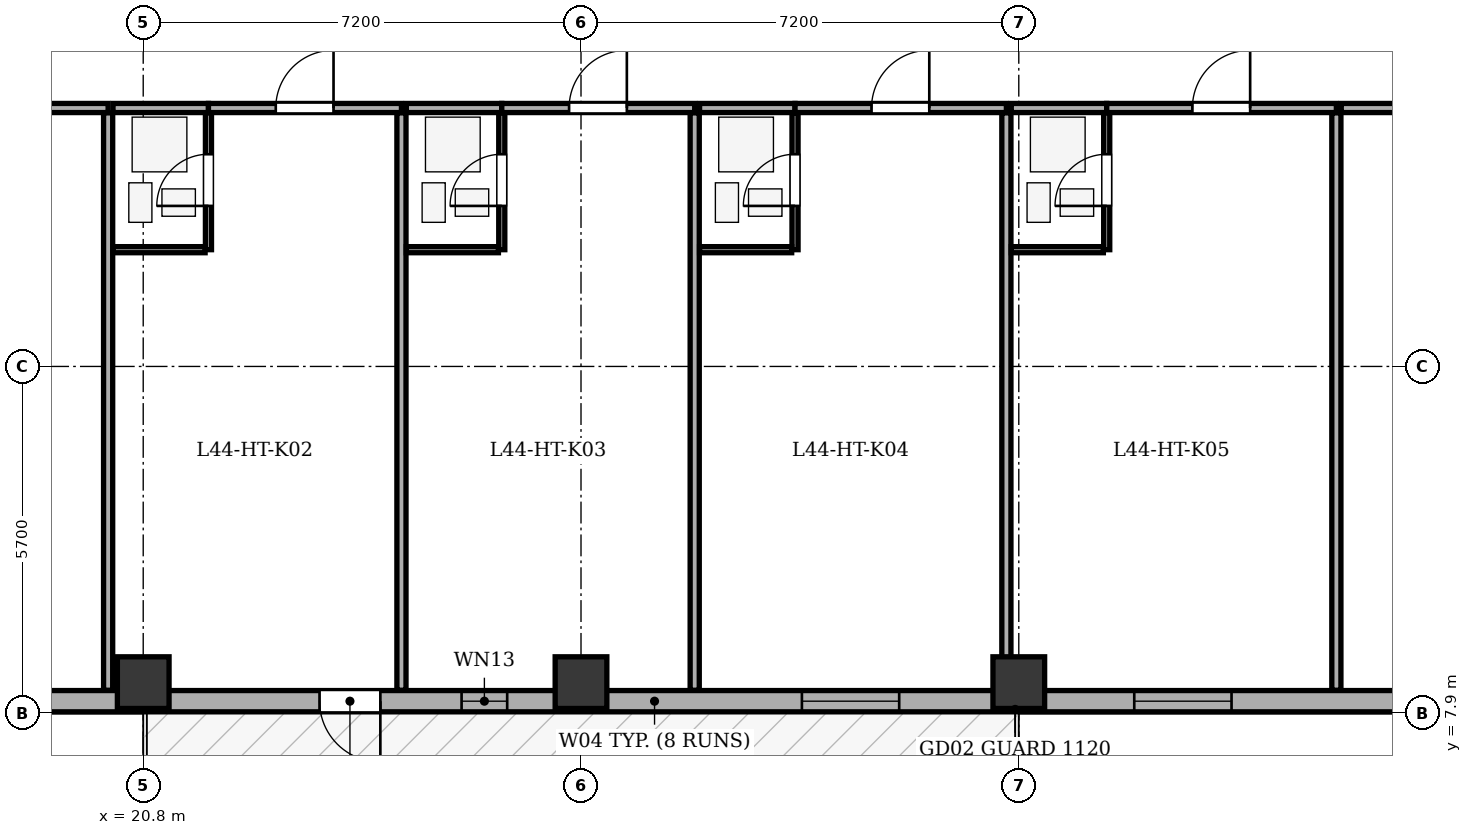
"""IFC4 building model, lengths in metres.
Left out: names, types, materials, properties, quantities, classifications, styles, units other than length and angle.
Written with IfcOpenShell. Run it as: python <this file> out.ifc"""

import sys

from ifc_helpers import new_model, si_unit, direction, frame, frame_2d, origin, origin_2d, place, context, subcontext, project, spatial, rectangle, extrude, element, fill, save


model = new_model("IFC4")
c1 = context("Model", 3, precision=1e-05, world=origin(), true_north=direction((0.0, 1.0)))
c2 = subcontext(c1, "Body", "Model", "MODEL_VIEW")
j1 = project(units=[si_unit("LENGTHUNIT", "METRE"), si_unit("PLANEANGLEUNIT", "RADIAN")], contexts=[c1])
p1 = place(None, origin())
s1 = spatial("IfcSite", under=j1, at=p1, CompositionType="ELEMENT")
p2 = place(p1, origin())
s2 = spatial("IfcBuilding", under=s1, at=p2, CompositionType="ELEMENT")
p3 = place(p2, frame((0.0, 0.0, 172.8)))
s3 = spatial("IfcBuildingStorey", under=s2, at=p3, CompositionType="ELEMENT", Elevation=172.8)
for number, where, z_axis, x_axis in (
    (1, (20.8, 8.4, 0.0), (0.0, 0.0, 1.0), (1.0, 0.0, 0.0)),
    (2, (28.0, 8.4, 0.0), (0.0, 0.0, 1.0), (1.0, 0.0, 0.0)),
    (3, (35.2, 8.4, 0.0), (0.0, 0.0, 1.0), (1.0, 0.0, 0.0)),
):
    element("IfcColumn", number, at=place(p3, frame(where, z_axis=z_axis, x_axis=x_axis)), inside=s3, PredefinedType="COLUMN", context=c2, shape_type="SweptSolid", body=[
        extrude(rectangle(XDim=0.85, YDim=0.85, at=origin_2d()), origin(), (0.0, 0.0, 1.0), 3.5),
    ])
p4 = place(p3, frame((50.7, 8.095, 0.0), z_axis=(0.0, 0.0, 1.0), x_axis=(-1.0, 0.0, 0.0)))
e4 = element("IfcWall", 4, at=p4, inside=s3, PredefinedType="STANDARD", context=c2, shape_type="SweptSolid", body=[
    extrude(rectangle(XDim=35.0, YDim=0.35, at=frame_2d((17.5, 0.0))), origin(), (0.0, 0.0, 1.0), 2.785),
])
p5 = place(p4, frame((26.0, 0.0, 0.0)))
e5 = element("IfcOpeningElement", 5, at=p5, cuts=e4, PredefinedType="OPENING", context=c2, shape_type="SweptSolid", body=[
    extrude(rectangle(XDim=1.0, YDim=2.02, at=frame_2d((0.5, 1.01))), frame((0.0, 0.185, 0.0), z_axis=(0.0, -1.0, 0.0), x_axis=(1.0, 0.0, 0.0)), (0.0, 0.0, 1.0), 0.37),
])
p6 = place(p4, frame((1.763, 0.0, 0.75)))
e6 = element("IfcOpeningElement", 6, at=p6, cuts=e4, PredefinedType="OPENING", context=c2, shape_type="SweptSolid", body=[
    extrude(rectangle(XDim=1.6, YDim=1.75, at=frame_2d((0.8, 0.875))), frame((0.0, 0.185, 0.0), z_axis=(0.0, -1.0, 0.0), x_axis=(1.0, 0.0, 0.0)), (0.0, 0.0, 1.0), 0.37),
])
p7 = place(p4, frame((6.764, 0.0, 0.75)))
e7 = element("IfcOpeningElement", 7, at=p7, cuts=e4, PredefinedType="OPENING", context=c2, shape_type="SweptSolid", body=[
    extrude(rectangle(XDim=1.6, YDim=1.75, at=frame_2d((0.8, 0.875))), frame((0.0, 0.185, 0.0), z_axis=(0.0, -1.0, 0.0), x_axis=(1.0, 0.0, 0.0)), (0.0, 0.0, 1.0), 0.37),
])
p8 = place(p4, frame((12.001, 0.0, 0.75)))
e8 = element("IfcOpeningElement", 8, at=p8, cuts=e4, PredefinedType="OPENING", context=c2, shape_type="SweptSolid", body=[
    extrude(rectangle(XDim=1.6, YDim=1.75, at=frame_2d((0.8, 0.875))), frame((0.0, 0.185, 0.0), z_axis=(0.0, -1.0, 0.0), x_axis=(1.0, 0.0, 0.0)), (0.0, 0.0, 1.0), 0.37),
])
p9 = place(p4, frame((17.467, 0.0, 0.75)))
e9 = element("IfcOpeningElement", 9, at=p9, cuts=e4, PredefinedType="OPENING", context=c2, shape_type="SweptSolid", body=[
    extrude(rectangle(XDim=1.6, YDim=1.75, at=frame_2d((0.8, 0.875))), frame((0.0, 0.185, 0.0), z_axis=(0.0, -1.0, 0.0), x_axis=(1.0, 0.0, 0.0)), (0.0, 0.0, 1.0), 0.37),
])
p10 = place(p4, frame((31.801, 0.0, 0.75)))
e10 = element("IfcOpeningElement", 10, at=p10, cuts=e4, PredefinedType="OPENING", context=c2, shape_type="SweptSolid", body=[
    extrude(rectangle(XDim=1.6, YDim=1.75, at=frame_2d((0.8, 0.875))), frame((0.0, 0.185, 0.0), z_axis=(0.0, -1.0, 0.0), x_axis=(1.0, 0.0, 0.0)), (0.0, 0.0, 1.0), 0.37),
])
p11 = place(p4, frame((23.914, 0.0, 0.75)))
e11 = element("IfcOpeningElement", 11, at=p11, cuts=e4, PredefinedType="OPENING", context=c2, shape_type="SweptSolid", body=[
    extrude(rectangle(XDim=0.75, YDim=1.45, at=frame_2d((0.375, 0.725))), frame((0.0, 0.185, 0.0), z_axis=(0.0, -1.0, 0.0), x_axis=(1.0, 0.0, 0.0)), (0.0, 0.0, 1.0), 0.37),
])
p12 = place(p3, frame((17.35, 17.85, 0.0), z_axis=(0.0, 0.0, 1.0), x_axis=(1.0, 0.0, 0.0)))
e12 = element("IfcWall", 12, at=p12, inside=s3, PredefinedType="PARTITIONING", context=c2, shape_type="SweptSolid", body=[
    extrude(rectangle(XDim=2.873, YDim=0.15, at=frame_2d((1.437, 0.0))), origin(), (0.0, 0.0, 1.0), 3.2),
])
p13 = place(p12, frame((0.957, 0.0, 0.0)))
e13 = element("IfcOpeningElement", 13, at=p13, cuts=e12, PredefinedType="OPENING", context=c2, shape_type="SweptSolid", body=[
    extrude(rectangle(XDim=0.95, YDim=2.1, at=frame_2d((0.475, 1.05))), frame((0.0, 0.085, 0.0), z_axis=(0.0, -1.0, 0.0), x_axis=(1.0, 0.0, 0.0)), (0.0, 0.0, 1.0), 0.17),
])
p14 = place(p3, frame((20.223, 8.275, 0.0), z_axis=(0.0, 0.0, 1.0), x_axis=(0.0, 1.0, 0.0)))
e14 = element("IfcWall", 14, at=p14, inside=s3, PredefinedType="PARTITIONING", context=c2, shape_type="SweptSolid", body=[
    extrude(rectangle(XDim=9.495, YDim=0.15, at=frame_2d((4.748, 0.0))), origin(), (0.0, 0.0, 1.0), 3.2),
])
p15 = place(p3, frame((20.303, 17.85, 0.0), z_axis=(0.0, 0.0, 1.0), x_axis=(1.0, 0.0, 0.0)))
e15 = element("IfcWall", 15, at=p15, inside=s3, PredefinedType="PARTITIONING", context=c2, shape_type="SweptSolid", body=[
    extrude(rectangle(XDim=1.57, YDim=0.15, at=frame_2d((0.785, 0.0))), origin(), (0.0, 0.0, 1.0), 3.2),
])
p16 = place(p3, frame((21.873, 17.85, 0.0), z_axis=(0.0, 0.0, 1.0), x_axis=(1.0, 0.0, 0.0)))
e16 = element("IfcWall", 16, at=p16, inside=s3, PredefinedType="PARTITIONING", context=c2, shape_type="SweptSolid", body=[
    extrude(rectangle(XDim=3.174, YDim=0.15, at=frame_2d((1.587, 0.0))), origin(), (0.0, 0.0, 1.0), 3.2),
])
p17 = place(p16, frame((1.107, 0.0, 0.0)))
e17 = element("IfcOpeningElement", 17, at=p17, cuts=e16, PredefinedType="OPENING", context=c2, shape_type="SweptSolid", body=[
    extrude(rectangle(XDim=0.95, YDim=2.1, at=frame_2d((0.475, 1.05))), frame((0.0, 0.085, 0.0), z_axis=(0.0, -1.0, 0.0), x_axis=(1.0, 0.0, 0.0)), (0.0, 0.0, 1.0), 0.17),
])
p18 = place(p3, frame((21.873, 15.52, 0.0), z_axis=(0.0, 0.0, 1.0), x_axis=(0.0, 1.0, 0.0)))
e18 = element("IfcWall", 18, at=p18, inside=s3, PredefinedType="PARTITIONING", context=c2, shape_type="SweptSolid", body=[
    extrude(rectangle(XDim=2.25, YDim=0.1, at=frame_2d((1.125, 0.0))), origin(), (0.0, 0.0, 1.0), 3.2),
])
p19 = place(p18, frame((0.72, 0.0, 0.0)))
e19 = element("IfcOpeningElement", 19, at=p19, cuts=e18, PredefinedType="OPENING", context=c2, shape_type="SweptSolid", body=[
    extrude(rectangle(XDim=0.85, YDim=2.05, at=frame_2d((0.425, 1.025))), frame((0.0, 0.06, 0.0), z_axis=(0.0, -1.0, 0.0), x_axis=(1.0, 0.0, 0.0)), (0.0, 0.0, 1.0), 0.12),
])
p20 = place(p3, frame((20.303, 15.52, 0.0), z_axis=(0.0, 0.0, 1.0), x_axis=(1.0, 0.0, 0.0)))
e20 = element("IfcWall", 20, at=p20, inside=s3, PredefinedType="PARTITIONING", context=c2, shape_type="SweptSolid", body=[
    extrude(rectangle(XDim=1.515, YDim=0.1, at=frame_2d((0.758, 0.0))), origin(), (0.0, 0.0, 1.0), 3.2),
])
p21 = place(p3, frame((25.047, 8.275, 0.0), z_axis=(0.0, 0.0, 1.0), x_axis=(0.0, 1.0, 0.0)))
e21 = element("IfcWall", 21, at=p21, inside=s3, PredefinedType="PARTITIONING", context=c2, shape_type="SweptSolid", body=[
    extrude(rectangle(XDim=9.495, YDim=0.15, at=frame_2d((4.748, 0.0))), origin(), (0.0, 0.0, 1.0), 3.2),
])
p22 = place(p3, frame((25.127, 17.85, 0.0), z_axis=(0.0, 0.0, 1.0), x_axis=(1.0, 0.0, 0.0)))
e22 = element("IfcWall", 22, at=p22, inside=s3, PredefinedType="PARTITIONING", context=c2, shape_type="SweptSolid", body=[
    extrude(rectangle(XDim=1.57, YDim=0.15, at=frame_2d((0.785, 0.0))), origin(), (0.0, 0.0, 1.0), 3.2),
])
p23 = place(p3, frame((26.697, 17.85, 0.0), z_axis=(0.0, 0.0, 1.0), x_axis=(1.0, 0.0, 0.0)))
e23 = element("IfcWall", 23, at=p23, inside=s3, PredefinedType="PARTITIONING", context=c2, shape_type="SweptSolid", body=[
    extrude(rectangle(XDim=3.173, YDim=0.15, at=frame_2d((1.586, 0.0))), origin(), (0.0, 0.0, 1.0), 3.2),
])
p24 = place(p23, frame((1.107, 0.0, 0.0)))
e24 = element("IfcOpeningElement", 24, at=p24, cuts=e23, PredefinedType="OPENING", context=c2, shape_type="SweptSolid", body=[
    extrude(rectangle(XDim=0.95, YDim=2.1, at=frame_2d((0.475, 1.05))), frame((0.0, 0.085, 0.0), z_axis=(0.0, -1.0, 0.0), x_axis=(1.0, 0.0, 0.0)), (0.0, 0.0, 1.0), 0.17),
])
p25 = place(p3, frame((26.697, 15.52, 0.0), z_axis=(0.0, 0.0, 1.0), x_axis=(0.0, 1.0, 0.0)))
e25 = element("IfcWall", 25, at=p25, inside=s3, PredefinedType="PARTITIONING", context=c2, shape_type="SweptSolid", body=[
    extrude(rectangle(XDim=2.25, YDim=0.1, at=frame_2d((1.125, 0.0))), origin(), (0.0, 0.0, 1.0), 3.2),
])
p26 = place(p25, frame((0.72, 0.0, 0.0)))
e26 = element("IfcOpeningElement", 26, at=p26, cuts=e25, PredefinedType="OPENING", context=c2, shape_type="SweptSolid", body=[
    extrude(rectangle(XDim=0.85, YDim=2.05, at=frame_2d((0.425, 1.025))), frame((0.0, 0.06, 0.0), z_axis=(0.0, -1.0, 0.0), x_axis=(1.0, 0.0, 0.0)), (0.0, 0.0, 1.0), 0.12),
])
p27 = place(p3, frame((25.127, 15.52, 0.0), z_axis=(0.0, 0.0, 1.0), x_axis=(1.0, 0.0, 0.0)))
e27 = element("IfcWall", 27, at=p27, inside=s3, PredefinedType="PARTITIONING", context=c2, shape_type="SweptSolid", body=[
    extrude(rectangle(XDim=1.515, YDim=0.1, at=frame_2d((0.758, 0.0))), origin(), (0.0, 0.0, 1.0), 3.2),
])
p28 = place(p3, frame((29.87, 8.275, 0.0), z_axis=(0.0, 0.0, 1.0), x_axis=(0.0, 1.0, 0.0)))
e28 = element("IfcWall", 28, at=p28, inside=s3, PredefinedType="PARTITIONING", context=c2, shape_type="SweptSolid", body=[
    extrude(rectangle(XDim=9.495, YDim=0.15, at=frame_2d((4.748, 0.0))), origin(), (0.0, 0.0, 1.0), 2.785),
])
p29 = place(p3, frame((29.95, 17.85, 0.0), z_axis=(0.0, 0.0, 1.0), x_axis=(1.0, 0.0, 0.0)))
e29 = element("IfcWall", 29, at=p29, inside=s3, PredefinedType="PARTITIONING", context=c2, shape_type="SweptSolid", body=[
    extrude(rectangle(XDim=1.57, YDim=0.15, at=frame_2d((0.785, 0.0))), origin(), (0.0, 0.0, 1.0), 3.2),
])
p30 = place(p3, frame((31.52, 17.85, 0.0), z_axis=(0.0, 0.0, 1.0), x_axis=(1.0, 0.0, 0.0)))
e30 = element("IfcWall", 30, at=p30, inside=s3, PredefinedType="PARTITIONING", context=c2, shape_type="SweptSolid", body=[
    extrude(rectangle(XDim=3.476, YDim=0.15, at=frame_2d((1.738, 0.0))), origin(), (0.0, 0.0, 1.0), 3.2),
])
p31 = place(p30, frame((1.258, 0.0, 0.0)))
e31 = element("IfcOpeningElement", 31, at=p31, cuts=e30, PredefinedType="OPENING", context=c2, shape_type="SweptSolid", body=[
    extrude(rectangle(XDim=0.95, YDim=2.1, at=frame_2d((0.475, 1.05))), frame((0.0, 0.085, 0.0), z_axis=(0.0, -1.0, 0.0), x_axis=(1.0, 0.0, 0.0)), (0.0, 0.0, 1.0), 0.17),
])
p32 = place(p3, frame((31.52, 15.52, 0.0), z_axis=(0.0, 0.0, 1.0), x_axis=(0.0, 1.0, 0.0)))
e32 = element("IfcWall", 32, at=p32, inside=s3, PredefinedType="PARTITIONING", context=c2, shape_type="SweptSolid", body=[
    extrude(rectangle(XDim=2.25, YDim=0.1, at=frame_2d((1.125, 0.0))), origin(), (0.0, 0.0, 1.0), 3.2),
])
p33 = place(p32, frame((0.72, 0.0, 0.0)))
e33 = element("IfcOpeningElement", 33, at=p33, cuts=e32, PredefinedType="OPENING", context=c2, shape_type="SweptSolid", body=[
    extrude(rectangle(XDim=0.85, YDim=2.05, at=frame_2d((0.425, 1.025))), frame((0.0, 0.06, 0.0), z_axis=(0.0, -1.0, 0.0), x_axis=(1.0, 0.0, 0.0)), (0.0, 0.0, 1.0), 0.12),
])
p34 = place(p3, frame((29.95, 15.52, 0.0), z_axis=(0.0, 0.0, 1.0), x_axis=(1.0, 0.0, 0.0)))
e34 = element("IfcWall", 34, at=p34, inside=s3, PredefinedType="PARTITIONING", context=c2, shape_type="SweptSolid", body=[
    extrude(rectangle(XDim=1.515, YDim=0.1, at=frame_2d((0.758, 0.0))), origin(), (0.0, 0.0, 1.0), 3.2),
])
p35 = place(p3, frame((34.996, 8.275, 0.0), z_axis=(0.0, 0.0, 1.0), x_axis=(0.0, 1.0, 0.0)))
e35 = element("IfcWall", 35, at=p35, inside=s3, PredefinedType="PARTITIONING", context=c2, shape_type="SweptSolid", body=[
    extrude(rectangle(XDim=9.495, YDim=0.15, at=frame_2d((4.748, 0.0))), origin(), (0.0, 0.0, 1.0), 2.535),
])
p36 = place(p3, frame((35.076, 17.85, 0.0), z_axis=(0.0, 0.0, 1.0), x_axis=(1.0, 0.0, 0.0)))
e36 = element("IfcWall", 36, at=p36, inside=s3, PredefinedType="PARTITIONING", context=c2, shape_type="SweptSolid", body=[
    extrude(rectangle(XDim=1.57, YDim=0.15, at=frame_2d((0.785, 0.0))), origin(), (0.0, 0.0, 1.0), 3.2),
])
p37 = place(p3, frame((36.646, 17.85, 0.0), z_axis=(0.0, 0.0, 1.0), x_axis=(1.0, 0.0, 0.0)))
e37 = element("IfcWall", 37, at=p37, inside=s3, PredefinedType="PARTITIONING", context=c2, shape_type="SweptSolid", body=[
    extrude(rectangle(XDim=3.777, YDim=0.15, at=frame_2d((1.889, 0.0))), origin(), (0.0, 0.0, 1.0), 3.2),
])
p38 = place(p37, frame((1.409, 0.0, 0.0)))
e38 = element("IfcOpeningElement", 38, at=p38, cuts=e37, PredefinedType="OPENING", context=c2, shape_type="SweptSolid", body=[
    extrude(rectangle(XDim=0.95, YDim=2.1, at=frame_2d((0.475, 1.05))), frame((0.0, 0.085, 0.0), z_axis=(0.0, -1.0, 0.0), x_axis=(1.0, 0.0, 0.0)), (0.0, 0.0, 1.0), 0.17),
])
p39 = place(p3, frame((36.646, 15.52, 0.0), z_axis=(0.0, 0.0, 1.0), x_axis=(0.0, 1.0, 0.0)))
e39 = element("IfcWall", 39, at=p39, inside=s3, PredefinedType="PARTITIONING", context=c2, shape_type="SweptSolid", body=[
    extrude(rectangle(XDim=2.25, YDim=0.1, at=frame_2d((1.125, 0.0))), origin(), (0.0, 0.0, 1.0), 3.2),
])
p40 = place(p39, frame((0.72, 0.0, 0.0)))
e40 = element("IfcOpeningElement", 40, at=p40, cuts=e39, PredefinedType="OPENING", context=c2, shape_type="SweptSolid", body=[
    extrude(rectangle(XDim=0.85, YDim=2.05, at=frame_2d((0.425, 1.025))), frame((0.0, 0.06, 0.0), z_axis=(0.0, -1.0, 0.0), x_axis=(1.0, 0.0, 0.0)), (0.0, 0.0, 1.0), 0.12),
])
p41 = place(p3, frame((35.076, 15.52, 0.0), z_axis=(0.0, 0.0, 1.0), x_axis=(1.0, 0.0, 0.0)))
e41 = element("IfcWall", 41, at=p41, inside=s3, PredefinedType="PARTITIONING", context=c2, shape_type="SweptSolid", body=[
    extrude(rectangle(XDim=1.515, YDim=0.1, at=frame_2d((0.758, 0.0))), origin(), (0.0, 0.0, 1.0), 3.2),
])
p42 = place(p3, frame((40.423, 8.275, 0.0), z_axis=(0.0, 0.0, 1.0), x_axis=(0.0, 1.0, 0.0)))
e42 = element("IfcWall", 42, at=p42, inside=s3, PredefinedType="PARTITIONING", context=c2, shape_type="SweptSolid", body=[
    extrude(rectangle(XDim=9.495, YDim=0.15, at=frame_2d((4.748, 0.0))), origin(), (0.0, 0.0, 1.0), 3.2),
])
p43 = place(p3, frame((40.503, 17.85, 0.0), z_axis=(0.0, 0.0, 1.0), x_axis=(1.0, 0.0, 0.0)))
e43 = element("IfcWall", 43, at=p43, inside=s3, PredefinedType="PARTITIONING", context=c2, shape_type="SweptSolid", body=[
    extrude(rectangle(XDim=5.347, YDim=0.15, at=frame_2d((2.674, 0.0))), origin(), (0.0, 0.0, 1.0), 3.2),
])
p44 = place(p43, frame((2.114, 0.0, 0.0)))
e44 = element("IfcOpeningElement", 44, at=p44, cuts=e43, PredefinedType="OPENING", context=c2, shape_type="SweptSolid", body=[
    extrude(rectangle(XDim=1.0, YDim=2.1, at=frame_2d((0.5, 1.05))), frame((0.0, 0.085, 0.0), z_axis=(0.0, -1.0, 0.0), x_axis=(1.0, 0.0, 0.0)), (0.0, 0.0, 1.0), 0.17),
])
p45 = place(p5, origin())
e45 = element("IfcDoor", 45, at=p45, inside=s3, OperationType="SINGLE_SWING_LEFT", PredefinedType="DOOR", context=c2, shape_type="SweptSolid", body=[
    extrude(rectangle(XDim=1.0, YDim=2.02, at=frame_2d((0.5, 1.01))), frame((0.0, 0.025, 0.0), z_axis=(0.0, -1.0, 0.0), x_axis=(1.0, 0.0, 0.0)), (0.0, 0.0, 1.0), 0.05),
])
fill(e5, e45)
p46 = place(p8, origin())
e46 = element("IfcWindow", 46, at=p46, inside=s3, PartitioningType="SINGLE_PANEL", PredefinedType="WINDOW", context=c2, shape_type="SweptSolid", body=[
    extrude(rectangle(XDim=1.6, YDim=1.75, at=frame_2d((0.8, 0.875))), frame((0.0, -0.01, 0.0), z_axis=(0.0, -1.0, 0.0), x_axis=(1.0, 0.0, 0.0)), (0.0, 0.0, 1.0), 0.06),
])
fill(e8, e46)
p47 = place(p9, origin())
e47 = element("IfcWindow", 47, at=p47, inside=s3, PartitioningType="SINGLE_PANEL", PredefinedType="WINDOW", context=c2, shape_type="SweptSolid", body=[
    extrude(rectangle(XDim=1.6, YDim=1.75, at=frame_2d((0.8, 0.875))), frame((0.0, -0.01, 0.0), z_axis=(0.0, -1.0, 0.0), x_axis=(1.0, 0.0, 0.0)), (0.0, 0.0, 1.0), 0.06),
])
fill(e9, e47)
p48 = place(p11, origin())
e48 = element("IfcWindow", 48, at=p48, inside=s3, PartitioningType="SINGLE_PANEL", PredefinedType="WINDOW", context=c2, shape_type="SweptSolid", body=[
    extrude(rectangle(XDim=0.75, YDim=1.45, at=frame_2d((0.375, 0.725))), frame((0.0, -0.01, 0.0), z_axis=(0.0, -1.0, 0.0), x_axis=(1.0, 0.0, 0.0)), (0.0, 0.0, 1.0), 0.06),
])
fill(e11, e48)
p49 = place(p19, origin())
e49 = element("IfcDoor", 49, at=p49, inside=s3, OperationType="SINGLE_SWING_LEFT", PredefinedType="DOOR", context=c2, shape_type="SweptSolid", body=[
    extrude(rectangle(XDim=0.85, YDim=2.05, at=frame_2d((0.425, 1.025))), frame((0.0, 0.025, 0.0), z_axis=(0.0, -1.0, 0.0), x_axis=(1.0, 0.0, 0.0)), (0.0, 0.0, 1.0), 0.05),
])
fill(e19, e49)
p50 = place(p17, origin())
e50 = element("IfcDoor", 50, at=p50, inside=s3, OperationType="SINGLE_SWING_RIGHT", PredefinedType="DOOR", context=c2, shape_type="SweptSolid", body=[
    extrude(rectangle(XDim=0.95, YDim=2.1, at=frame_2d((0.475, 1.05))), frame((0.0, 0.025, 0.0), z_axis=(0.0, -1.0, 0.0), x_axis=(1.0, 0.0, 0.0)), (0.0, 0.0, 1.0), 0.05),
])
fill(e17, e50)
p51 = place(p26, origin())
e51 = element("IfcDoor", 51, at=p51, inside=s3, OperationType="SINGLE_SWING_LEFT", PredefinedType="DOOR", context=c2, shape_type="SweptSolid", body=[
    extrude(rectangle(XDim=0.85, YDim=2.05, at=frame_2d((0.425, 1.025))), frame((0.0, 0.025, 0.0), z_axis=(0.0, -1.0, 0.0), x_axis=(1.0, 0.0, 0.0)), (0.0, 0.0, 1.0), 0.05),
])
fill(e26, e51)
p52 = place(p24, origin())
e52 = element("IfcDoor", 52, at=p52, inside=s3, OperationType="SINGLE_SWING_RIGHT", PredefinedType="DOOR", context=c2, shape_type="SweptSolid", body=[
    extrude(rectangle(XDim=0.95, YDim=2.1, at=frame_2d((0.475, 1.05))), frame((0.0, 0.025, 0.0), z_axis=(0.0, -1.0, 0.0), x_axis=(1.0, 0.0, 0.0)), (0.0, 0.0, 1.0), 0.05),
])
fill(e24, e52)
p53 = place(p33, origin())
e53 = element("IfcDoor", 53, at=p53, inside=s3, OperationType="SINGLE_SWING_LEFT", PredefinedType="DOOR", context=c2, shape_type="SweptSolid", body=[
    extrude(rectangle(XDim=0.85, YDim=2.05, at=frame_2d((0.425, 1.025))), frame((0.0, 0.025, 0.0), z_axis=(0.0, -1.0, 0.0), x_axis=(1.0, 0.0, 0.0)), (0.0, 0.0, 1.0), 0.05),
])
fill(e33, e53)
p54 = place(p31, origin())
e54 = element("IfcDoor", 54, at=p54, inside=s3, OperationType="SINGLE_SWING_RIGHT", PredefinedType="DOOR", context=c2, shape_type="SweptSolid", body=[
    extrude(rectangle(XDim=0.95, YDim=2.1, at=frame_2d((0.475, 1.05))), frame((0.0, 0.025, 0.0), z_axis=(0.0, -1.0, 0.0), x_axis=(1.0, 0.0, 0.0)), (0.0, 0.0, 1.0), 0.05),
])
fill(e31, e54)
p55 = place(p40, origin())
e55 = element("IfcDoor", 55, at=p55, inside=s3, OperationType="SINGLE_SWING_LEFT", PredefinedType="DOOR", context=c2, shape_type="SweptSolid", body=[
    extrude(rectangle(XDim=0.85, YDim=2.05, at=frame_2d((0.425, 1.025))), frame((0.0, 0.025, 0.0), z_axis=(0.0, -1.0, 0.0), x_axis=(1.0, 0.0, 0.0)), (0.0, 0.0, 1.0), 0.05),
])
fill(e40, e55)
p56 = place(p38, origin())
e56 = element("IfcDoor", 56, at=p56, inside=s3, OperationType="SINGLE_SWING_RIGHT", PredefinedType="DOOR", context=c2, shape_type="SweptSolid", body=[
    extrude(rectangle(XDim=0.95, YDim=2.1, at=frame_2d((0.475, 1.05))), frame((0.0, 0.025, 0.0), z_axis=(0.0, -1.0, 0.0), x_axis=(1.0, 0.0, 0.0)), (0.0, 0.0, 1.0), 0.05),
])
fill(e38, e56)
save(model, sys.argv[1])
